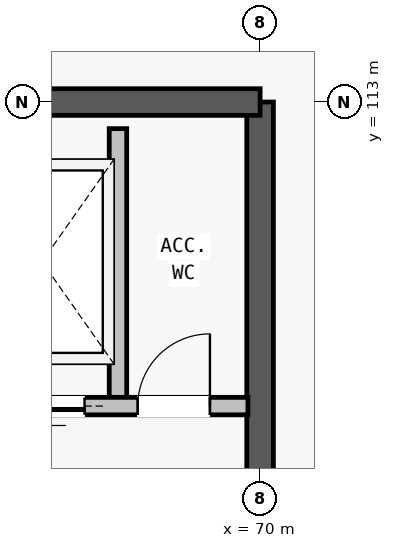
"""IFC4 building model, lengths in metres.
Left out: names, types, materials, properties, quantities, classifications, styles, units other than length and angle.
Written with IfcOpenShell. Run it as: python <this file> out.ifc"""

import sys

from ifc_helpers import new_model, si_unit, direction, frame, frame_2d, origin, place, context, subcontext, project, spatial, rectangle, extrude, element, fill, save


model = new_model("IFC4")
c1 = context("Model", 3, precision=1e-05, world=origin(), true_north=direction((0.0, 1.0)))
c2 = subcontext(c1, "Body", "Model", "MODEL_VIEW")
j1 = project(units=[si_unit("LENGTHUNIT", "METRE"), si_unit("PLANEANGLEUNIT", "RADIAN")], contexts=[c1])
p1 = place(None, origin())
s1 = spatial("IfcSite", under=j1, at=p1, CompositionType="ELEMENT")
p2 = place(p1, origin())
s2 = spatial("IfcBuilding", under=s1, at=p2, CompositionType="ELEMENT")
p3 = place(p2, frame((0.0, 0.0, 13.4)))
s3 = spatial("IfcBuildingStorey", under=s2, at=p3, CompositionType="ELEMENT", Elevation=13.4)
p4 = place(p3, frame((70.0, 104.0, 0.0), z_axis=(0.0, 0.0, 1.0), x_axis=(0.0, 1.0, 0.0)))
e1 = element("IfcWall", 1, at=p4, inside=s3, PredefinedType="SHEAR", context=c2, shape_type="SweptSolid", body=[
    extrude(rectangle(XDim=9.0, YDim=0.35, at=frame_2d((4.5, 0.0))), origin(), (0.0, 0.0, 1.0), 3.62),
])
p5 = place(p4, frame((1.4, 0.0, 0.0)))
e2 = element("IfcOpeningElement", 2, at=p5, cuts=e1, PredefinedType="OPENING", context=c2, shape_type="SweptSolid", body=[
    extrude(rectangle(XDim=1.9, YDim=2.3, at=frame_2d((0.95, 1.15))), frame((0.0, 0.185, 0.0), z_axis=(0.0, -1.0, 0.0), x_axis=(1.0, 0.0, 0.0)), (0.0, 0.0, 1.0), 0.37),
])
p6 = place(p3, frame((70.0, 113.0, 0.0), z_axis=(0.0, 0.0, 1.0), x_axis=(-1.0, 0.0, 0.0)))
e3 = element("IfcWall", 3, at=p6, inside=s3, PredefinedType="SHEAR", context=c2, shape_type="SweptSolid", body=[
    extrude(rectangle(XDim=8.0, YDim=0.35, at=frame_2d((4.0, 0.0))), origin(), (0.0, 0.0, 1.0), 3.62),
])
p7 = place(p3, frame((68.13, 109.0, 0.0), z_axis=(0.0, 0.0, 1.0), x_axis=(0.0, 1.0, 0.0)))
e4 = element("IfcWall", 4, at=p7, inside=s3, PredefinedType="PARTITIONING", context=c2, shape_type="SweptSolid", body=[
    extrude(rectangle(XDim=3.65, YDim=0.23, at=frame_2d((1.825, 0.0))), origin(), (0.0, 0.0, 1.0), 2.48),
])
p8 = place(p3, frame((66.21, 109.0, 0.0), z_axis=(0.0, 0.0, 1.0), x_axis=(1.0, 0.0, 0.0)))
e5 = element("IfcWall", 5, at=p8, inside=s3, PredefinedType="PARTITIONING", context=c2, shape_type="SweptSolid", body=[
    extrude(rectangle(XDim=3.63, YDim=0.23, at=frame_2d((1.815, 0.0))), origin(), (0.0, 0.0, 1.0), 2.48),
])
p9 = place(p8, frame((0.38, 0.0, 0.0)))
e6 = element("IfcOpeningElement", 6, at=p9, cuts=e5, PredefinedType="OPENING", context=c2, shape_type="SweptSolid", body=[
    extrude(rectangle(XDim=1.1, YDim=2.15, at=frame_2d((0.55, 1.075))), frame((0.0, 0.125, 0.0), z_axis=(0.0, -1.0, 0.0), x_axis=(1.0, 0.0, 0.0)), (0.0, 0.0, 1.0), 0.25),
])
p10 = place(p8, frame((2.18, 0.0, 0.0)))
e7 = element("IfcOpeningElement", 7, at=p10, cuts=e5, PredefinedType="OPENING", context=c2, shape_type="SweptSolid", body=[
    extrude(rectangle(XDim=0.95, YDim=2.1, at=frame_2d((0.475, 1.05))), frame((0.0, 0.125, 0.0), z_axis=(0.0, -1.0, 0.0), x_axis=(1.0, 0.0, 0.0)), (0.0, 0.0, 1.0), 0.25),
])
p11 = place(p9, origin())
e8 = element("IfcDoor", 8, at=p11, inside=s3, OperationType="SLIDING_TO_LEFT", PredefinedType="DOOR", context=c2, shape_type="SweptSolid", body=[
    extrude(rectangle(XDim=1.1, YDim=2.15, at=frame_2d((0.55, 1.075))), frame((0.0, 0.025, 0.0), z_axis=(0.0, -1.0, 0.0), x_axis=(1.0, 0.0, 0.0)), (0.0, 0.0, 1.0), 0.05),
])
fill(e6, e8)
p12 = place(p10, origin())
e9 = element("IfcDoor", 9, at=p12, inside=s3, OperationType="SINGLE_SWING_RIGHT", PredefinedType="DOOR", context=c2, shape_type="SweptSolid", body=[
    extrude(rectangle(XDim=0.95, YDim=2.1, at=frame_2d((0.475, 1.05))), frame((0.0, 0.025, 0.0), z_axis=(0.0, -1.0, 0.0), x_axis=(1.0, 0.0, 0.0)), (0.0, 0.0, 1.0), 0.05),
])
fill(e7, e9)
save(model, sys.argv[1])
